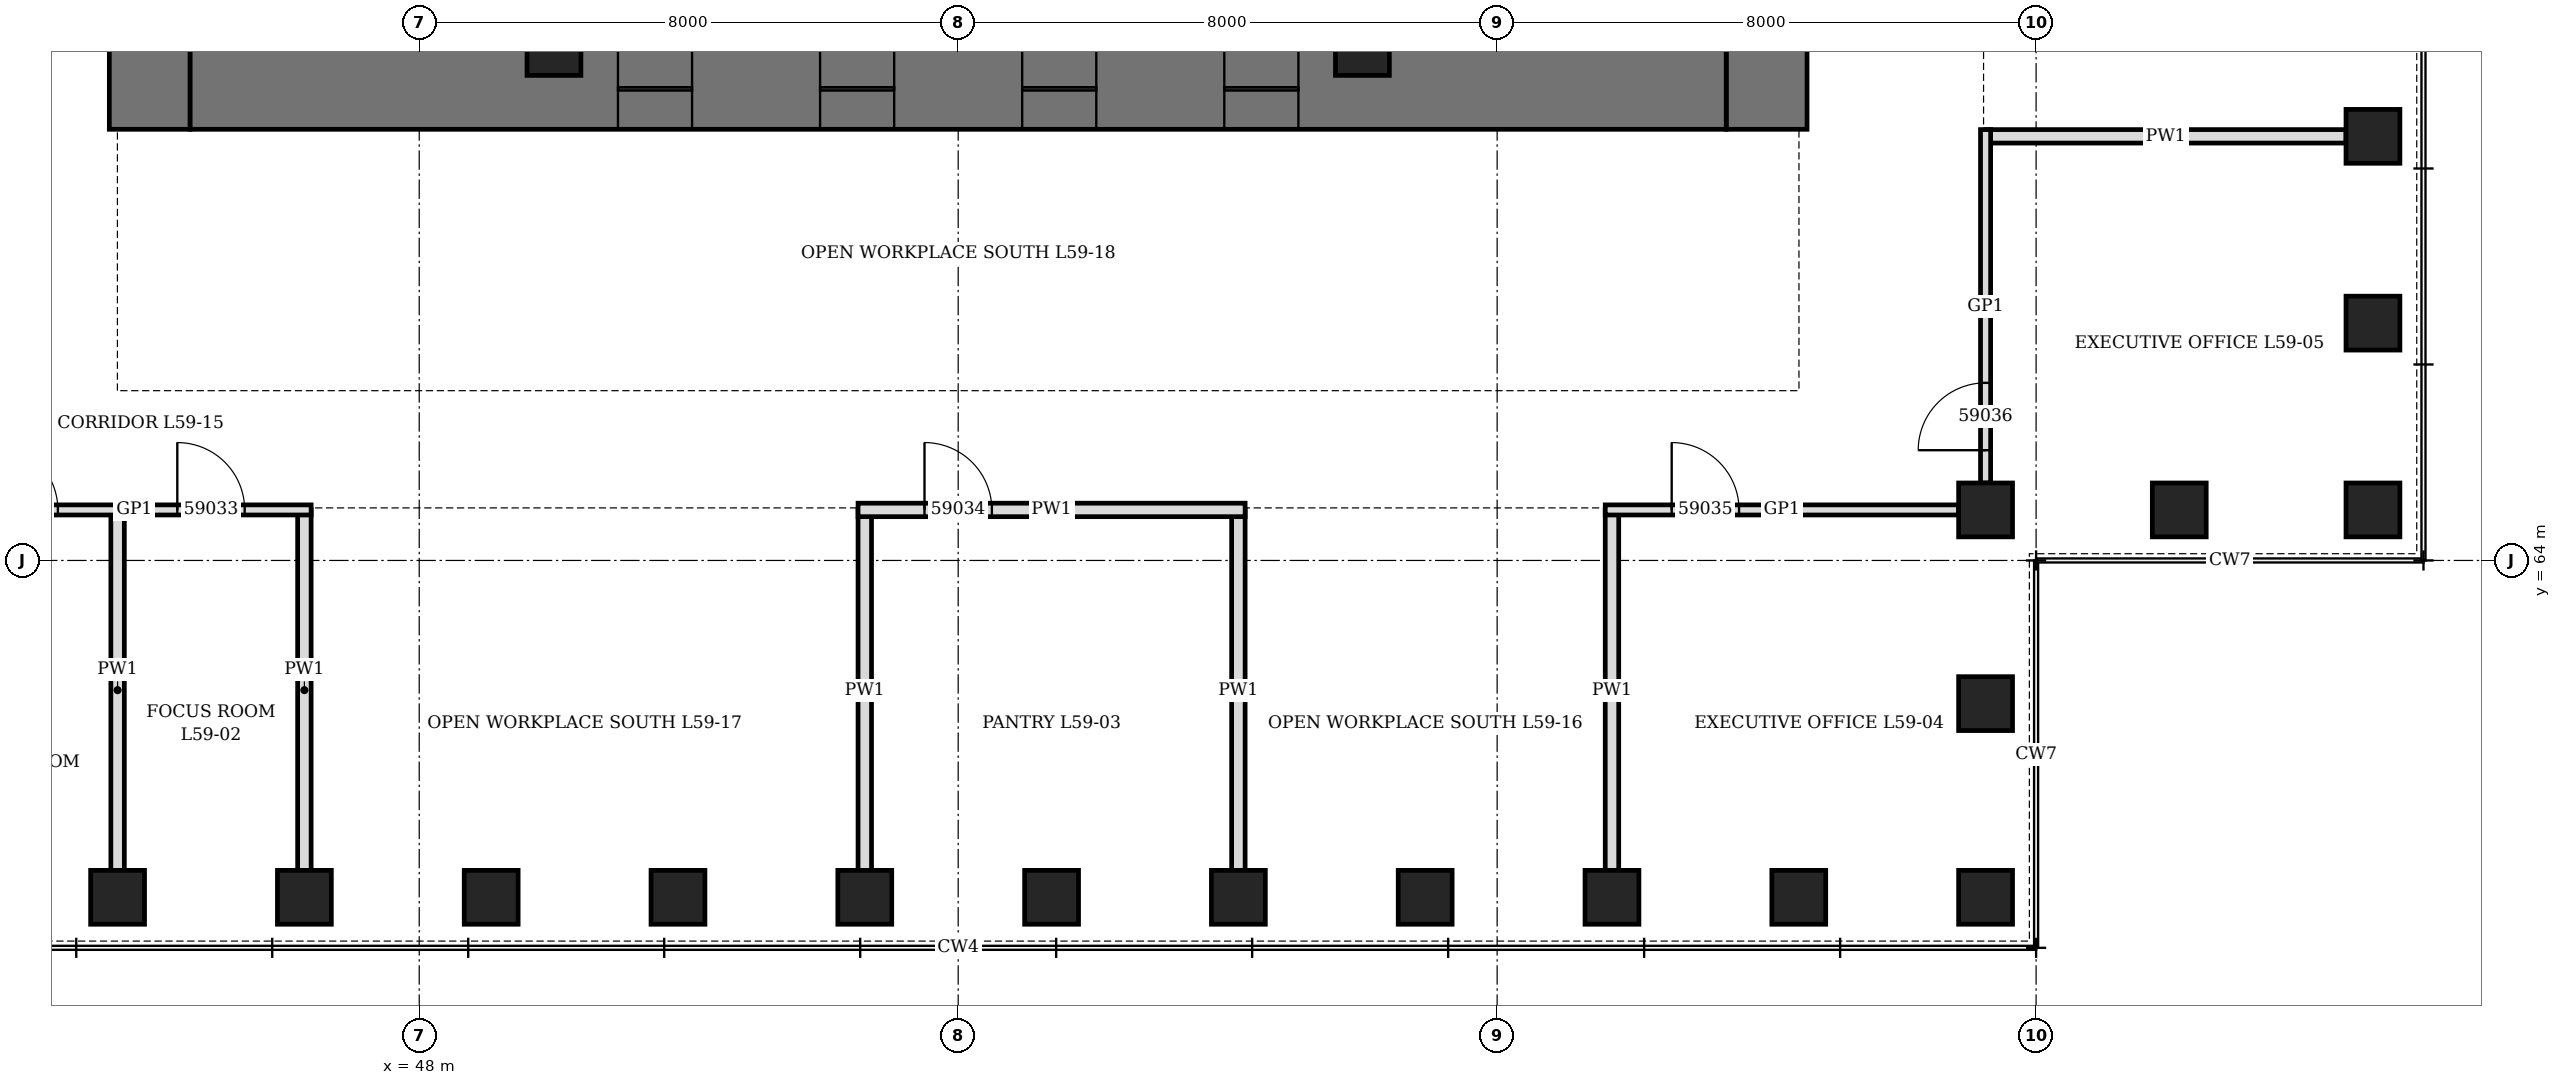
"""IFC4 building model, lengths in metres.
Left out: names, types, materials, properties, quantities, classifications, styles, units other than length and angle.
Written with IfcOpenShell. Run it as: python <this file> out.ifc"""

import sys

from ifc_helpers import new_model, si_unit, direction, frame, frame_2d, origin, origin_2d, place, context, subcontext, project, spatial, rectangle, hollow_rectangle, extrude, element, fill, save


model = new_model("IFC4")
c1 = context("Model", 3, precision=1e-05, world=origin(), true_north=direction((0.0, 1.0)))
c2 = subcontext(c1, "Body", "Model", "MODEL_VIEW")
j1 = project(units=[si_unit("LENGTHUNIT", "METRE"), si_unit("PLANEANGLEUNIT", "RADIAN")], contexts=[c1])
p1 = place(None, origin())
s1 = spatial("IfcSite", under=j1, at=p1, CompositionType="ELEMENT")
p2 = place(p1, origin())
s2 = spatial("IfcBuilding", under=s1, at=p2, CompositionType="ELEMENT")
p3 = place(p2, frame((0.0, 0.0, 262.9)))
s3 = spatial("IfcBuildingStorey", under=s2, at=p3, CompositionType="ELEMENT", Elevation=262.9)
for number, where, z_axis, x_axis in (
    (1, (43.523, 59.0, 0.0), (0.0, 0.0, 1.0), (1.0, 0.0, 0.0)),
    (2, (46.295, 59.0, 0.0), (0.0, 0.0, 1.0), (1.0, 0.0, 0.0)),
    (3, (49.068, 59.0, 0.0), (0.0, 0.0, 1.0), (1.0, 0.0, 0.0)),
    (4, (51.841, 59.0, 0.0), (0.0, 0.0, 1.0), (1.0, 0.0, 0.0)),
    (5, (54.614, 59.0, 0.0), (0.0, 0.0, 1.0), (1.0, 0.0, 0.0)),
    (6, (57.386, 59.0, 0.0), (0.0, 0.0, 1.0), (1.0, 0.0, 0.0)),
    (7, (60.159, 59.0, 0.0), (0.0, 0.0, 1.0), (1.0, 0.0, 0.0)),
    (8, (62.932, 59.0, 0.0), (0.0, 0.0, 1.0), (1.0, 0.0, 0.0)),
    (9, (65.705, 59.0, 0.0), (0.0, 0.0, 1.0), (1.0, 0.0, 0.0)),
    (10, (68.477, 59.0, 0.0), (0.0, 0.0, 1.0), (1.0, 0.0, 0.0)),
    (11, (71.25, 59.0, 0.0), (0.0, 0.0, 1.0), (0.0, 1.0, 0.0)),
    (12, (71.25, 61.875, 0.0), (0.0, 0.0, 1.0), (0.0, 1.0, 0.0)),
    (13, (71.25, 64.75, 0.0), (0.0, 0.0, 1.0), (1.0, 0.0, 0.0)),
    (14, (74.125, 64.75, 0.0), (0.0, 0.0, 1.0), (1.0, 0.0, 0.0)),
    (15, (77.0, 64.75, 0.0), (0.0, 0.0, 1.0), (0.0, 1.0, 0.0)),
    (16, (77.0, 67.523, 0.0), (0.0, 0.0, 1.0), (0.0, 1.0, 0.0)),
    (17, (77.0, 70.295, 0.0), (0.0, 0.0, 1.0), (0.0, 1.0, 0.0)),
):
    element("IfcColumn", number, at=place(p3, frame(where, z_axis=z_axis, x_axis=x_axis)), inside=s3, PredefinedType="COLUMN", context=c2, shape_type="SweptSolid", body=[
        extrude(hollow_rectangle(XDim=0.8, YDim=0.8, WallThickness=0.1, at=origin_2d()), origin(), (0.0, 0.0, 1.0), 4.2),
    ])
p4 = place(p3, frame((44.0, 70.4, 0.0), z_axis=(0.0, 0.0, 1.0), x_axis=(0.0, 1.0, 0.0)))
e18 = element("IfcWall", 18, at=p4, inside=s3, PredefinedType="SHEAR", context=c2, shape_type="SweptSolid", body=[
    extrude(rectangle(XDim=19.2, YDim=1.2, at=frame_2d((9.6, 0.0))), origin(), (0.0, 0.0, 1.0), 4.2),
])
p5 = place(p4, frame((8.6, 0.0, 0.0)))
e19 = element("IfcOpeningElement", 19, at=p5, cuts=e18, PredefinedType="OPENING", context=c2, shape_type="SweptSolid", body=[
    extrude(rectangle(XDim=2.0, YDim=2.4, at=frame_2d((1.0, 1.2))), frame((0.0, 0.61, 0.0), z_axis=(0.0, -1.0, 0.0), x_axis=(1.0, 0.0, 0.0)), (0.0, 0.0, 1.0), 1.22),
])
p6 = place(p3, frame((68.0, 70.4, 0.0), z_axis=(0.0, 0.0, 1.0), x_axis=(0.0, 1.0, 0.0)))
e20 = element("IfcWall", 20, at=p6, inside=s3, PredefinedType="SHEAR", context=c2, shape_type="SweptSolid", body=[
    extrude(rectangle(XDim=19.2, YDim=1.2, at=frame_2d((9.6, 0.0))), origin(), (0.0, 0.0, 1.0), 4.2),
])
p7 = place(p6, frame((8.6, 0.0, 0.0)))
e21 = element("IfcOpeningElement", 21, at=p7, cuts=e20, PredefinedType="OPENING", context=c2, shape_type="SweptSolid", body=[
    extrude(rectangle(XDim=2.0, YDim=2.4, at=frame_2d((1.0, 1.2))), frame((0.0, 0.61, 0.0), z_axis=(0.0, -1.0, 0.0), x_axis=(1.0, 0.0, 0.0)), (0.0, 0.0, 1.0), 1.22),
])
p8 = place(p3, frame((44.6, 71.0, 0.0), z_axis=(0.0, 0.0, 1.0), x_axis=(1.0, 0.0, 0.0)))
e22 = element("IfcWall", 22, at=p8, inside=s3, PredefinedType="SHEAR", context=c2, shape_type="SweptSolid", body=[
    extrude(rectangle(XDim=22.8, YDim=1.2, at=frame_2d((11.4, 0.0))), origin(), (0.0, 0.0, 1.0), 4.2),
])
p9 = place(p8, frame((6.35, 0.0, 0.0)))
e23 = element("IfcOpeningElement", 23, at=p9, cuts=e22, PredefinedType="OPENING", context=c2, shape_type="SweptSolid", body=[
    extrude(rectangle(XDim=1.1, YDim=2.2, at=frame_2d((0.55, 1.1))), frame((0.0, 0.61, 0.0), z_axis=(0.0, -1.0, 0.0), x_axis=(1.0, 0.0, 0.0)), (0.0, 0.0, 1.0), 1.22),
])
p10 = place(p8, frame((9.35, 0.0, 0.0)))
e24 = element("IfcOpeningElement", 24, at=p10, cuts=e22, PredefinedType="OPENING", context=c2, shape_type="SweptSolid", body=[
    extrude(rectangle(XDim=1.1, YDim=2.2, at=frame_2d((0.55, 1.1))), frame((0.0, 0.61, 0.0), z_axis=(0.0, -1.0, 0.0), x_axis=(1.0, 0.0, 0.0)), (0.0, 0.0, 1.0), 1.22),
])
p11 = place(p8, frame((12.35, 0.0, 0.0)))
e25 = element("IfcOpeningElement", 25, at=p11, cuts=e22, PredefinedType="OPENING", context=c2, shape_type="SweptSolid", body=[
    extrude(rectangle(XDim=1.1, YDim=2.2, at=frame_2d((0.55, 1.1))), frame((0.0, 0.61, 0.0), z_axis=(0.0, -1.0, 0.0), x_axis=(1.0, 0.0, 0.0)), (0.0, 0.0, 1.0), 1.22),
])
p12 = place(p8, frame((15.35, 0.0, 0.0)))
e26 = element("IfcOpeningElement", 26, at=p12, cuts=e22, PredefinedType="OPENING", context=c2, shape_type="SweptSolid", body=[
    extrude(rectangle(XDim=1.1, YDim=2.2, at=frame_2d((0.55, 1.1))), frame((0.0, 0.61, 0.0), z_axis=(0.0, -1.0, 0.0), x_axis=(1.0, 0.0, 0.0)), (0.0, 0.0, 1.0), 1.22),
])
for number, where, z_axis, x_axis in (
    (27, (50.0, 71.6, 0.0), (0.0, 0.0, 1.0), (1.0, 0.0, 0.0)),
    (28, (62.0, 71.6, 0.0), (0.0, 0.0, 1.0), (1.0, 0.0, 0.0)),
):
    element("IfcColumn", number, at=place(p3, frame(where, z_axis=z_axis, x_axis=x_axis)), inside=s3, PredefinedType="COLUMN", context=c2, shape_type="SweptSolid", body=[
        extrude(hollow_rectangle(XDim=0.8, YDim=0.8, WallThickness=0.1, at=origin_2d()), origin(), (0.0, 0.0, 1.0), 4.2),
    ])
for number, where, z_axis, x_axis in (
    (29, (43.523, 59.4, 0.0), (0.0, 0.0, 1.0), (0.0, 1.0, 0.0)),
    (30, (46.295, 59.4, 0.0), (0.0, 0.0, 1.0), (0.0, 1.0, 0.0)),
    (31, (54.614, 59.4, 0.0), (0.0, 0.0, 1.0), (0.0, 1.0, 0.0)),
    (32, (60.159, 59.4, 0.0), (0.0, 0.0, 1.0), (0.0, 1.0, 0.0)),
    (33, (65.705, 59.4, 0.0), (0.0, 0.0, 1.0), (0.0, 1.0, 0.0)),
    (34, (71.25, 70.295, 0.0), (0.0, 0.0, 1.0), (1.0, 0.0, 0.0)),
):
    element("IfcWall", number, at=place(p3, frame(where, z_axis=z_axis, x_axis=x_axis)), inside=s3, PredefinedType="PARTITIONING", context=c2, shape_type="SweptSolid", body=[
        extrude(rectangle(XDim=5.35, YDim=0.2, at=frame_2d((2.675, 0.0))), origin(), (0.0, 0.0, 1.0), 3.428),
    ])
p13 = place(p3, frame((41.15, 64.75, 0.0), z_axis=(0.0, 0.0, 1.0), x_axis=(1.0, 0.0, 0.0)))
e35 = element("IfcWall", 35, at=p13, inside=s3, PredefinedType="PARTITIONING", context=c2, shape_type="SweptSolid", body=[
    extrude(rectangle(XDim=5.246, YDim=0.15, at=frame_2d((2.623, 0.0))), origin(), (0.0, 0.0, 1.0), 4.04),
])
p14 = place(p13, frame((0.486, 0.0, 0.0)))
e36 = element("IfcOpeningElement", 36, at=p14, cuts=e35, PredefinedType="OPENING", context=c2, shape_type="SweptSolid", body=[
    extrude(rectangle(XDim=1.0, YDim=2.4, at=frame_2d((0.5, 1.2))), frame((0.0, 0.085, 0.0), z_axis=(0.0, -1.0, 0.0), x_axis=(1.0, 0.0, 0.0)), (0.0, 0.0, 1.0), 0.17),
])
p15 = place(p13, frame((3.259, 0.0, 0.0)))
e37 = element("IfcOpeningElement", 37, at=p15, cuts=e35, PredefinedType="OPENING", context=c2, shape_type="SweptSolid", body=[
    extrude(rectangle(XDim=1.0, YDim=2.4, at=frame_2d((0.5, 1.2))), frame((0.0, 0.085, 0.0), z_axis=(0.0, -1.0, 0.0), x_axis=(1.0, 0.0, 0.0)), (0.0, 0.0, 1.0), 0.17),
])
p16 = place(p3, frame((65.604, 64.75, 0.0), z_axis=(0.0, 0.0, 1.0), x_axis=(1.0, 0.0, 0.0)))
e38 = element("IfcWall", 38, at=p16, inside=s3, PredefinedType="PARTITIONING", context=c2, shape_type="SweptSolid", body=[
    extrude(rectangle(XDim=5.246, YDim=0.15, at=frame_2d((2.623, 0.0))), origin(), (0.0, 0.0, 1.0), 4.04),
])
p17 = place(p16, frame((0.986, 0.0, 0.0)))
e39 = element("IfcOpeningElement", 39, at=p17, cuts=e38, PredefinedType="OPENING", context=c2, shape_type="SweptSolid", body=[
    extrude(rectangle(XDim=1.0, YDim=2.1, at=frame_2d((0.5, 1.05))), frame((0.0, 0.085, 0.0), z_axis=(0.0, -1.0, 0.0), x_axis=(1.0, 0.0, 0.0)), (0.0, 0.0, 1.0), 0.17),
])
p18 = place(p3, frame((54.514, 64.75, 0.0), z_axis=(0.0, 0.0, 1.0), x_axis=(1.0, 0.0, 0.0)))
e40 = element("IfcWall", 40, at=p18, inside=s3, PredefinedType="PARTITIONING", context=c2, shape_type="SweptSolid", body=[
    extrude(rectangle(XDim=5.745, YDim=0.2, at=frame_2d((2.873, 0.0))), origin(), (0.0, 0.0, 1.0), 4.04),
])
p19 = place(p18, frame((0.986, 0.0, 0.0)))
e41 = element("IfcOpeningElement", 41, at=p19, cuts=e40, PredefinedType="OPENING", context=c2, shape_type="SweptSolid", body=[
    extrude(rectangle(XDim=1.0, YDim=2.1, at=frame_2d((0.5, 1.05))), frame((0.0, 0.11, 0.0), z_axis=(0.0, -1.0, 0.0), x_axis=(1.0, 0.0, 0.0)), (0.0, 0.0, 1.0), 0.22),
])
p20 = place(p3, frame((71.25, 65.15, 0.0), z_axis=(0.0, 0.0, 1.0), x_axis=(0.0, 1.0, 0.0)))
e42 = element("IfcWall", 42, at=p20, inside=s3, PredefinedType="PARTITIONING", context=c2, shape_type="SweptSolid", body=[
    extrude(rectangle(XDim=5.246, YDim=0.15, at=frame_2d((2.623, 0.0))), origin(), (0.0, 0.0, 1.0), 4.04),
])
p21 = place(p20, frame((0.486, 0.0, 0.0)))
e43 = element("IfcOpeningElement", 43, at=p21, cuts=e42, PredefinedType="OPENING", context=c2, shape_type="SweptSolid", body=[
    extrude(rectangle(XDim=1.0, YDim=2.1, at=frame_2d((0.5, 1.05))), frame((0.0, 0.085, 0.0), z_axis=(0.0, -1.0, 0.0), x_axis=(1.0, 0.0, 0.0)), (0.0, 0.0, 1.0), 0.17),
])
p22 = place(p9, origin())
e44 = element("IfcDoor", 44, at=p22, inside=s3, OperationType="SLIDING_TO_LEFT", PredefinedType="DOOR", context=c2, shape_type="SweptSolid", body=[
    extrude(rectangle(XDim=1.1, YDim=2.2, at=frame_2d((0.55, 1.1))), frame((0.0, 0.35, 0.0), z_axis=(0.0, -1.0, 0.0), x_axis=(1.0, 0.0, 0.0)), (0.0, 0.0, 1.0), 0.7),
])
fill(e23, e44)
p23 = place(p10, origin())
e45 = element("IfcDoor", 45, at=p23, inside=s3, OperationType="SLIDING_TO_LEFT", PredefinedType="DOOR", context=c2, shape_type="SweptSolid", body=[
    extrude(rectangle(XDim=1.1, YDim=2.2, at=frame_2d((0.55, 1.1))), frame((0.0, 0.35, 0.0), z_axis=(0.0, -1.0, 0.0), x_axis=(1.0, 0.0, 0.0)), (0.0, 0.0, 1.0), 0.7),
])
fill(e24, e45)
p24 = place(p11, origin())
e46 = element("IfcDoor", 46, at=p24, inside=s3, OperationType="SLIDING_TO_LEFT", PredefinedType="DOOR", context=c2, shape_type="SweptSolid", body=[
    extrude(rectangle(XDim=1.1, YDim=2.2, at=frame_2d((0.55, 1.1))), frame((0.0, 0.35, 0.0), z_axis=(0.0, -1.0, 0.0), x_axis=(1.0, 0.0, 0.0)), (0.0, 0.0, 1.0), 0.7),
])
fill(e25, e46)
p25 = place(p12, origin())
e47 = element("IfcDoor", 47, at=p25, inside=s3, OperationType="SLIDING_TO_LEFT", PredefinedType="DOOR", context=c2, shape_type="SweptSolid", body=[
    extrude(rectangle(XDim=1.1, YDim=2.2, at=frame_2d((0.55, 1.1))), frame((0.0, 0.35, 0.0), z_axis=(0.0, -1.0, 0.0), x_axis=(1.0, 0.0, 0.0)), (0.0, 0.0, 1.0), 0.7),
])
fill(e26, e47)
p26 = place(p14, origin())
e48 = element("IfcDoor", 48, at=p26, inside=s3, OperationType="SINGLE_SWING_RIGHT", PredefinedType="DOOR", context=c2, shape_type="SweptSolid", body=[
    extrude(rectangle(XDim=1.0, YDim=2.4, at=frame_2d((0.5, 1.2))), frame((0.0, 0.075, 0.0), z_axis=(0.0, -1.0, 0.0), x_axis=(1.0, 0.0, 0.0)), (0.0, 0.0, 1.0), 0.149),
])
fill(e36, e48)
p27 = place(p15, origin())
e49 = element("IfcDoor", 49, at=p27, inside=s3, OperationType="SINGLE_SWING_RIGHT", PredefinedType="DOOR", context=c2, shape_type="SweptSolid", body=[
    extrude(rectangle(XDim=1.0, YDim=2.4, at=frame_2d((0.5, 1.2))), frame((0.0, 0.075, 0.0), z_axis=(0.0, -1.0, 0.0), x_axis=(1.0, 0.0, 0.0)), (0.0, 0.0, 1.0), 0.149),
])
fill(e37, e49)
p28 = place(p19, origin())
e50 = element("IfcDoor", 50, at=p28, inside=s3, OperationType="SINGLE_SWING_LEFT", PredefinedType="DOOR", context=c2, shape_type="SweptSolid", body=[
    extrude(rectangle(XDim=1.0, YDim=2.1, at=frame_2d((0.5, 1.05))), frame((0.0, 0.1, 0.0), z_axis=(0.0, -1.0, 0.0), x_axis=(1.0, 0.0, 0.0)), (0.0, 0.0, 1.0), 0.199),
])
fill(e41, e50)
p29 = place(p17, origin())
e51 = element("IfcDoor", 51, at=p29, inside=s3, OperationType="SINGLE_SWING_LEFT", PredefinedType="DOOR", context=c2, shape_type="SweptSolid", body=[
    extrude(rectangle(XDim=1.0, YDim=2.1, at=frame_2d((0.5, 1.05))), frame((0.0, 0.075, 0.0), z_axis=(0.0, -1.0, 0.0), x_axis=(1.0, 0.0, 0.0)), (0.0, 0.0, 1.0), 0.149),
])
fill(e39, e51)
p30 = place(p21, origin())
e52 = element("IfcDoor", 52, at=p30, inside=s3, OperationType="SINGLE_SWING_LEFT", PredefinedType="DOOR", context=c2, shape_type="SweptSolid", body=[
    extrude(rectangle(XDim=1.0, YDim=2.1, at=frame_2d((0.5, 1.05))), frame((0.0, 0.075, 0.0), z_axis=(0.0, -1.0, 0.0), x_axis=(1.0, 0.0, 0.0)), (0.0, 0.0, 1.0), 0.149),
])
fill(e43, e52)
save(model, sys.argv[1])
